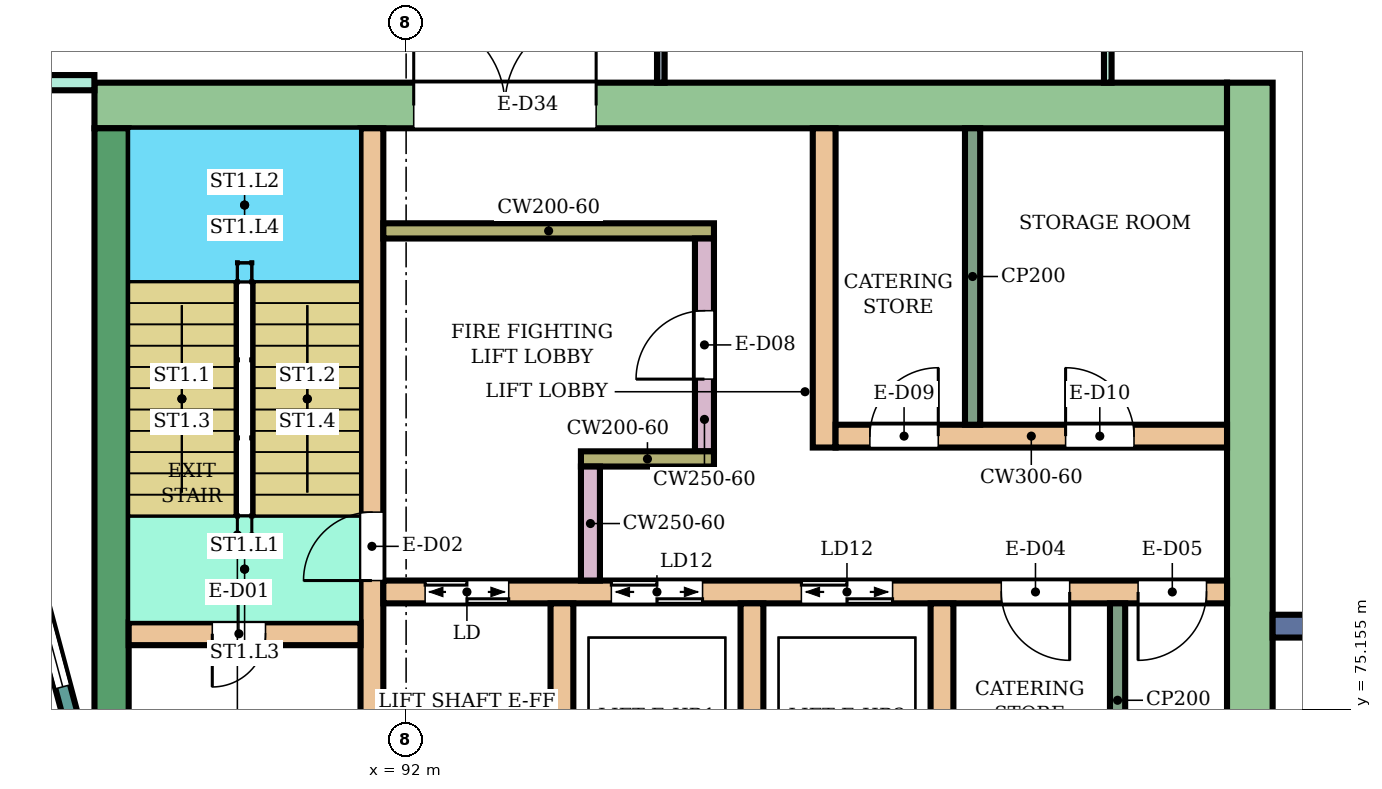
"""IFC4 building model, lengths in metres.
Left out: names, types, materials, properties, quantities, classifications, styles, units other than length and angle.
Written with IfcOpenShell. Run it as: python <this file> out.ifc"""

import sys

from ifc_helpers import new_model, si_unit, direction, frame, frame_2d, origin, place, context, subcontext, project, spatial, rectangle, extrude, element, fill, save


model = new_model("IFC4")
c1 = context("Model", 3, precision=1e-05, world=origin(), true_north=direction((0.0, 1.0)))
c2 = subcontext(c1, "Body", "Model", "MODEL_VIEW")
j1 = project(units=[si_unit("LENGTHUNIT", "METRE"), si_unit("PLANEANGLEUNIT", "RADIAN")], contexts=[c1])
p1 = place(None, origin())
s1 = spatial("IfcSite", under=j1, at=p1, CompositionType="ELEMENT")
p2 = place(p1, origin())
s2 = spatial("IfcBuilding", under=s1, at=p2, CompositionType="ELEMENT")
p3 = place(p2, frame((0.0, 0.0, 229.3)))
s3 = spatial("IfcBuildingStorey", under=s2, at=p3, CompositionType="ELEMENT", Elevation=229.3)
p4 = place(p3, frame((87.9, 83.1, 0.0), z_axis=(0.0, 0.0, 1.0), x_axis=(1.0, 0.0, 0.0)))
e1 = element("IfcWall", 1, at=p4, inside=s3, PredefinedType="SHEAR", context=c2, shape_type="SweptSolid", body=[
    extrude(rectangle(XDim=14.9, YDim=0.6, at=frame_2d((7.45, 0.0))), origin(), (0.0, 0.0, 1.0), 7.68),
])
p5 = place(p4, frame((4.2, 0.0, 0.0)))
e2 = element("IfcOpeningElement", 2, at=p5, cuts=e1, PredefinedType="OPENING", context=c2, shape_type="SweptSolid", body=[
    extrude(rectangle(XDim=2.4, YDim=2.4, at=frame_2d((1.2, 1.2))), frame((0.0, 0.31, 0.0), z_axis=(0.0, -1.0, 0.0), x_axis=(1.0, 0.0, 0.0)), (0.0, 0.0, 1.0), 0.62),
])
p6 = place(p3, frame((88.125, 75.0, 0.0), z_axis=(0.0, 0.0, 1.0), x_axis=(0.0, 1.0, 0.0)))
e3 = element("IfcWall", 3, at=p6, inside=s3, PredefinedType="SHEAR", context=c2, shape_type="SweptSolid", body=[
    extrude(rectangle(XDim=7.8, YDim=0.45, at=frame_2d((3.9, 0.0))), origin(), (0.0, 0.0, 1.0), 7.68),
])
p7 = place(p3, frame((103.1, 66.6, 0.0), z_axis=(0.0, 0.0, 1.0), x_axis=(0.0, 1.0, 0.0)))
e4 = element("IfcWall", 4, at=p7, inside=s3, PredefinedType="SHEAR", context=c2, shape_type="SweptSolid", body=[
    extrude(rectangle(XDim=16.8, YDim=0.6, at=frame_2d((8.4, 0.0))), origin(), (0.0, 0.0, 1.0), 7.68),
])
p8 = place(p3, frame((91.55, 75.0, 0.0), z_axis=(0.0, 0.0, 1.0), x_axis=(0.0, 1.0, 0.0)))
e5 = element("IfcWall", 5, at=p8, inside=s3, PredefinedType="SHEAR", context=c2, shape_type="SweptSolid", body=[
    extrude(rectangle(XDim=7.8, YDim=0.3, at=frame_2d((3.9, 0.0))), origin(), (0.0, 0.0, 1.0), 7.68),
])
p9 = place(p8, frame((1.85, 0.0, 0.0)))
e6 = element("IfcOpeningElement", 6, at=p9, cuts=e5, PredefinedType="OPENING", context=c2, shape_type="SweptSolid", body=[
    extrude(rectangle(XDim=0.9, YDim=2.1, at=frame_2d((0.45, 1.05))), frame((0.0, 0.16, 0.0), z_axis=(0.0, -1.0, 0.0), x_axis=(1.0, 0.0, 0.0)), (0.0, 0.0, 1.0), 0.32),
])
p10 = place(p3, frame((88.35, 76.15, 0.0), z_axis=(0.0, 0.0, 1.0), x_axis=(1.0, 0.0, 0.0)))
e7 = element("IfcWall", 7, at=p10, inside=s3, PredefinedType="SHEAR", context=c2, shape_type="SweptSolid", body=[
    extrude(rectangle(XDim=3.05, YDim=0.3, at=frame_2d((1.525, 0.0))), origin(), (0.0, 0.0, 1.0), 7.68),
])
p11 = place(p10, frame((1.1, 0.0, 0.0)))
e8 = element("IfcOpeningElement", 8, at=p11, cuts=e7, PredefinedType="OPENING", context=c2, shape_type="SweptSolid", body=[
    extrude(rectangle(XDim=0.7, YDim=2.0, at=frame_2d((0.35, 1.0))), frame((0.0, 0.16, 0.0), z_axis=(0.0, -1.0, 0.0), x_axis=(1.0, 0.0, 0.0)), (0.0, 0.0, 1.0), 0.32),
])
p12 = place(p3, frame((91.7, 76.7, 0.0), z_axis=(0.0, 0.0, 1.0), x_axis=(1.0, 0.0, 0.0)))
e9 = element("IfcWall", 9, at=p12, inside=s3, PredefinedType="SHEAR", context=c2, shape_type="SweptSolid", body=[
    extrude(rectangle(XDim=11.1, YDim=0.3, at=frame_2d((5.55, 0.0))), origin(), (0.0, 0.0, 1.0), 7.68),
])
p13 = place(p12, frame((0.55, 0.0, 0.0)))
e10 = element("IfcOpeningElement", 10, at=p13, cuts=e9, PredefinedType="OPENING", context=c2, shape_type="SweptSolid", body=[
    extrude(rectangle(XDim=1.1, YDim=2.1, at=frame_2d((0.55, 1.05))), frame((0.0, 0.16, 0.0), z_axis=(0.0, -1.0, 0.0), x_axis=(1.0, 0.0, 0.0)), (0.0, 0.0, 1.0), 0.32),
])
p14 = place(p12, frame((3.0, 0.0, 0.0)))
e11 = element("IfcOpeningElement", 11, at=p14, cuts=e9, PredefinedType="OPENING", context=c2, shape_type="SweptSolid", body=[
    extrude(rectangle(XDim=1.2, YDim=2.1, at=frame_2d((0.6, 1.05))), frame((0.0, 0.16, 0.0), z_axis=(0.0, -1.0, 0.0), x_axis=(1.0, 0.0, 0.0)), (0.0, 0.0, 1.0), 0.32),
])
p15 = place(p12, frame((5.5, 0.0, 0.0)))
e12 = element("IfcOpeningElement", 12, at=p15, cuts=e9, PredefinedType="OPENING", context=c2, shape_type="SweptSolid", body=[
    extrude(rectangle(XDim=1.2, YDim=2.1, at=frame_2d((0.6, 1.05))), frame((0.0, 0.16, 0.0), z_axis=(0.0, -1.0, 0.0), x_axis=(1.0, 0.0, 0.0)), (0.0, 0.0, 1.0), 0.32),
])
p16 = place(p12, frame((8.13, 0.0, 0.0)))
e13 = element("IfcOpeningElement", 13, at=p16, cuts=e9, PredefinedType="OPENING", context=c2, shape_type="SweptSolid", body=[
    extrude(rectangle(XDim=0.9, YDim=2.1, at=frame_2d((0.45, 1.05))), frame((0.0, 0.16, 0.0), z_axis=(0.0, -1.0, 0.0), x_axis=(1.0, 0.0, 0.0)), (0.0, 0.0, 1.0), 0.32),
])
p17 = place(p12, frame((9.93, 0.0, 0.0)))
e14 = element("IfcOpeningElement", 14, at=p17, cuts=e9, PredefinedType="OPENING", context=c2, shape_type="SweptSolid", body=[
    extrude(rectangle(XDim=0.9, YDim=2.1, at=frame_2d((0.45, 1.05))), frame((0.0, 0.16, 0.0), z_axis=(0.0, -1.0, 0.0), x_axis=(1.0, 0.0, 0.0)), (0.0, 0.0, 1.0), 0.32),
])
for number, where, z_axis, x_axis in (
    (15, (94.05, 74.0, 0.0), (0.0, 0.0, 1.0), (0.0, 1.0, 0.0)),
    (16, (96.55, 74.0, 0.0), (0.0, 0.0, 1.0), (0.0, 1.0, 0.0)),
    (17, (99.05, 74.0, 0.0), (0.0, 0.0, 1.0), (0.0, 1.0, 0.0)),
):
    element("IfcWall", number, at=place(p3, frame(where, z_axis=z_axis, x_axis=x_axis)), inside=s3, PredefinedType="SHEAR", context=c2, shape_type="SweptSolid", body=[
        extrude(rectangle(XDim=2.55, YDim=0.3, at=frame_2d((1.275, 0.0))), origin(), (0.0, 0.0, 1.0), 7.68),
    ])
p18 = place(p3, frame((91.7, 81.45, 0.0), z_axis=(0.0, 0.0, 1.0), x_axis=(1.0, 0.0, 0.0)))
e18 = element("IfcWall", 18, at=p18, inside=s3, PredefinedType="SHEAR", context=c2, shape_type="SweptSolid", body=[
    extrude(rectangle(XDim=4.35, YDim=0.2, at=frame_2d((2.175, 0.0))), origin(), (0.0, 0.0, 1.0), 7.68),
])
p19 = place(p3, frame((95.925, 78.55, 0.0), z_axis=(0.0, 0.0, 1.0), x_axis=(0.0, 1.0, 0.0)))
e19 = element("IfcWall", 19, at=p19, inside=s3, PredefinedType="SHEAR", context=c2, shape_type="SweptSolid", body=[
    extrude(rectangle(XDim=2.8, YDim=0.25, at=frame_2d((1.4, 0.0))), origin(), (0.0, 0.0, 1.0), 7.68),
])
p20 = place(p19, frame((0.95, 0.0, 0.0)))
e20 = element("IfcOpeningElement", 20, at=p20, cuts=e19, PredefinedType="OPENING", context=c2, shape_type="SweptSolid", body=[
    extrude(rectangle(XDim=0.9, YDim=2.1, at=frame_2d((0.45, 1.05))), frame((0.0, 0.135, 0.0), z_axis=(0.0, -1.0, 0.0), x_axis=(1.0, 0.0, 0.0)), (0.0, 0.0, 1.0), 0.27),
])
p21 = place(p3, frame((94.3, 78.45, 0.0), z_axis=(0.0, 0.0, 1.0), x_axis=(1.0, 0.0, 0.0)))
e21 = element("IfcWall", 21, at=p21, inside=s3, PredefinedType="SHEAR", context=c2, shape_type="SweptSolid", body=[
    extrude(rectangle(XDim=1.75, YDim=0.2, at=frame_2d((0.875, 0.0))), origin(), (0.0, 0.0, 1.0), 7.68),
])
p22 = place(p3, frame((94.425, 76.85, 0.0), z_axis=(0.0, 0.0, 1.0), x_axis=(0.0, 1.0, 0.0)))
e22 = element("IfcWall", 22, at=p22, inside=s3, PredefinedType="SHEAR", context=c2, shape_type="SweptSolid", body=[
    extrude(rectangle(XDim=1.5, YDim=0.25, at=frame_2d((0.75, 0.0))), origin(), (0.0, 0.0, 1.0), 7.68),
])
p23 = place(p3, frame((97.5, 78.6, 0.0), z_axis=(0.0, 0.0, 1.0), x_axis=(0.0, 1.0, 0.0)))
e23 = element("IfcWall", 23, at=p23, inside=s3, PredefinedType="SHEAR", context=c2, shape_type="SweptSolid", body=[
    extrude(rectangle(XDim=4.2, YDim=0.3, at=frame_2d((2.1, 0.0))), origin(), (0.0, 0.0, 1.0), 7.68),
])
p24 = place(p3, frame((97.65, 78.75, 0.0), z_axis=(0.0, 0.0, 1.0), x_axis=(1.0, 0.0, 0.0)))
e24 = element("IfcWall", 24, at=p24, inside=s3, PredefinedType="SHEAR", context=c2, shape_type="SweptSolid", body=[
    extrude(rectangle(XDim=5.15, YDim=0.3, at=frame_2d((2.575, 0.0))), origin(), (0.0, 0.0, 1.0), 7.68),
])
p25 = place(p24, frame((0.451, 0.0, 0.0)))
e25 = element("IfcOpeningElement", 25, at=p25, cuts=e24, PredefinedType="OPENING", context=c2, shape_type="SweptSolid", body=[
    extrude(rectangle(XDim=0.9, YDim=2.1, at=frame_2d((0.45, 1.05))), frame((0.0, 0.16, 0.0), z_axis=(0.0, -1.0, 0.0), x_axis=(1.0, 0.0, 0.0)), (0.0, 0.0, 1.0), 0.32),
])
p26 = place(p24, frame((3.026, 0.0, 0.0)))
e26 = element("IfcOpeningElement", 26, at=p26, cuts=e24, PredefinedType="OPENING", context=c2, shape_type="SweptSolid", body=[
    extrude(rectangle(XDim=0.9, YDim=2.1, at=frame_2d((0.45, 1.05))), frame((0.0, 0.16, 0.0), z_axis=(0.0, -1.0, 0.0), x_axis=(1.0, 0.0, 0.0)), (0.0, 0.0, 1.0), 0.32),
])
p27 = place(p3, frame((103.4, 76.25, 0.0), z_axis=(0.0, 0.0, 1.0), x_axis=(1.0, 0.0, 0.0)))
e27 = element("IfcWall", 27, at=p27, inside=s3, PredefinedType="NOTDEFINED", context=c2, shape_type="SweptSolid", body=[
    extrude(rectangle(XDim=2.416, YDim=0.3, at=frame_2d((1.208, 0.0))), origin(), (0.0, 0.0, 1.0), 8.0),
])
p28 = place(p3, frame((87.604, 75.0, 0.0), z_axis=(0.0, 0.0, 1.0), x_axis=(-0.258789828301, 0.965933654434, 0.0)))
e28 = element("IfcWall", 28, at=p28, inside=s3, PredefinedType="NOTDEFINED", context=c2, shape_type="SweptSolid", body=[
    extrude(rectangle(XDim=3.936, YDim=0.2, at=frame_2d((1.968, 0.0))), origin(), (0.0, 0.0, 1.0), 8.0),
])
p29 = place(p28, frame((0.468, 0.0, 0.9)))
e29 = element("IfcOpeningElement", 29, at=p29, cuts=e28, PredefinedType="OPENING", context=c2, shape_type="SweptSolid", body=[
    extrude(rectangle(XDim=3.0, YDim=2.3, at=frame_2d((1.5, 1.15))), frame((0.0, 0.11, 0.0), z_axis=(0.0, -1.0, 0.0), x_axis=(1.0, 0.0, 0.0)), (0.0, 0.0, 1.0), 0.22),
])
p30 = place(p3, frame((84.475, 82.751, 0.0), z_axis=(0.0, 0.0, 1.0), x_axis=(0.499996545922, 0.866027397988, 0.0)))
e30 = element("IfcWall", 30, at=p30, inside=s3, PredefinedType="NOTDEFINED", context=c2, shape_type="SweptSolid", body=[
    extrude(rectangle(XDim=8.25, YDim=0.2, at=frame_2d((4.125, 0.0))), origin(), (0.0, 0.0, 1.0), 8.0),
])
p31 = place(p30, frame((1.0, 0.0, 0.3)))
e31 = element("IfcOpeningElement", 31, at=p31, cuts=e30, PredefinedType="OPENING", context=c2, shape_type="SweptSolid", body=[
    extrude(rectangle(XDim=2.4, YDim=3.6, at=frame_2d((1.2, 1.8))), frame((0.0, 0.11, 0.0), z_axis=(0.0, -1.0, 0.0), x_axis=(1.0, 0.0, 0.0)), (0.0, 0.0, 1.0), 0.22),
])
p32 = place(p30, frame((3.85, 0.0, 0.0)))
e32 = element("IfcOpeningElement", 32, at=p32, cuts=e30, PredefinedType="OPENING", context=c2, shape_type="SweptSolid", body=[
    extrude(rectangle(XDim=1.8, YDim=2.4, at=frame_2d((0.9, 1.2))), frame((0.0, 0.11, 0.0), z_axis=(0.0, -1.0, 0.0), x_axis=(1.0, 0.0, 0.0)), (0.0, 0.0, 1.0), 0.22),
])
p33 = place(p30, frame((6.1, 0.0, 0.3)))
e33 = element("IfcOpeningElement", 33, at=p33, cuts=e30, PredefinedType="OPENING", context=c2, shape_type="SweptSolid", body=[
    extrude(rectangle(XDim=1.6, YDim=3.6, at=frame_2d((0.8, 1.8))), frame((0.0, 0.11, 0.0), z_axis=(0.0, -1.0, 0.0), x_axis=(1.0, 0.0, 0.0)), (0.0, 0.0, 1.0), 0.22),
])
p34 = place(p3, frame((84.851, 83.4, 0.0), z_axis=(0.0, 0.0, 1.0), x_axis=(1.0, 0.0, 0.0)))
e34 = element("IfcWall", 34, at=p34, inside=s3, PredefinedType="PARTITIONING", context=c2, shape_type="SweptSolid", body=[
    extrude(rectangle(XDim=3.048, YDim=0.2, at=frame_2d((1.524, 0.0))), origin(), (0.0, 0.0, 1.0), 7.55),
])
p35 = place(p3, frame((95.351, 83.4, 0.0), z_axis=(0.0, 0.0, 1.0), x_axis=(0.0, 1.0, 0.0)))
e35 = element("IfcWall", 35, at=p35, inside=s3, PredefinedType="PARTITIONING", context=c2, shape_type="SweptSolid", body=[
    extrude(rectangle(XDim=12.06, YDim=0.1, at=frame_2d((6.03, 0.0))), origin(), (0.0, 0.0, 1.0), 7.55),
])
p36 = place(p35, frame((4.23, 0.0, 0.0)))
e36 = element("IfcOpeningElement", 36, at=p36, cuts=e35, PredefinedType="OPENING", context=c2, shape_type="SweptSolid", body=[
    extrude(rectangle(XDim=1.8, YDim=2.1, at=frame_2d((0.9, 1.05))), frame((0.0, 0.06, 0.0), z_axis=(0.0, -1.0, 0.0), x_axis=(1.0, 0.0, 0.0)), (0.0, 0.0, 1.0), 0.12),
])
p37 = place(p3, frame((101.231, 83.4, 0.0), z_axis=(0.0, 0.0, 1.0), x_axis=(0.0, 1.0, 0.0)))
e37 = element("IfcWall", 37, at=p37, inside=s3, PredefinedType="PARTITIONING", context=c2, shape_type="SweptSolid", body=[
    extrude(rectangle(XDim=5.948, YDim=0.1, at=frame_2d((2.974, 0.0))), origin(), (0.0, 0.0, 1.0), 6.83),
])
p38 = place(p37, frame((2.424, 0.0, 0.0)))
e38 = element("IfcOpeningElement", 38, at=p38, cuts=e37, PredefinedType="OPENING", context=c2, shape_type="SweptSolid", body=[
    extrude(rectangle(XDim=0.8, YDim=2.1, at=frame_2d((0.4, 1.05))), frame((0.0, 0.06, 0.0), z_axis=(0.0, -1.0, 0.0), x_axis=(1.0, 0.0, 0.0)), (0.0, 0.0, 1.0), 0.12),
])
p39 = place(p3, frame((101.36, 74.0, 0.0), z_axis=(0.0, 0.0, 1.0), x_axis=(0.0, 1.0, 0.0)))
e39 = element("IfcWall", 39, at=p39, inside=s3, PredefinedType="PARTITIONING", context=c2, shape_type="SweptSolid", body=[
    extrude(rectangle(XDim=2.55, YDim=0.2, at=frame_2d((1.275, 0.0))), origin(), (0.0, 0.0, 1.0), 7.68),
])
p40 = place(p3, frame((99.452, 78.9, 0.0), z_axis=(0.0, 0.0, 1.0), x_axis=(0.0, 1.0, 0.0)))
e40 = element("IfcWall", 40, at=p40, inside=s3, PredefinedType="PARTITIONING", context=c2, shape_type="SweptSolid", body=[
    extrude(rectangle(XDim=3.9, YDim=0.2, at=frame_2d((1.95, 0.0))), origin(), (0.0, 0.0, 1.0), 7.68),
])
p41 = place(p29, origin())
e41 = element("IfcWindow", 41, at=p41, inside=s3, PartitioningType="SINGLE_PANEL", PredefinedType="WINDOW", context=c2, shape_type="SweptSolid", body=[
    extrude(rectangle(XDim=3.0, YDim=2.3, at=frame_2d((1.5, 1.15))), frame((0.0, 0.03, 0.0), z_axis=(0.0, -1.0, 0.0), x_axis=(1.0, 0.0, 0.0)), (0.0, 0.0, 1.0), 0.06),
])
fill(e29, e41)
p42 = place(p11, frame((0.7, 0.0, 0.0), z_axis=(0.0, 0.0, 1.0), x_axis=(-1.0, 0.0, 0.0)))
e42 = element("IfcDoor", 42, at=p42, inside=s3, OperationType="SINGLE_SWING_RIGHT", PredefinedType="DOOR", context=c2, shape_type="SweptSolid", body=[
    extrude(rectangle(XDim=0.7, YDim=2.0, at=frame_2d((0.35, 1.0))), frame((0.0, 0.025, 0.0), z_axis=(0.0, -1.0, 0.0), x_axis=(1.0, 0.0, 0.0)), (0.0, 0.0, 1.0), 0.05),
])
fill(e8, e42)
p43 = place(p9, origin())
e43 = element("IfcDoor", 43, at=p43, inside=s3, OperationType="SINGLE_SWING_LEFT", PredefinedType="DOOR", context=c2, shape_type="SweptSolid", body=[
    extrude(rectangle(XDim=0.9, YDim=2.1, at=frame_2d((0.45, 1.05))), frame((0.0, 0.025, 0.0), z_axis=(0.0, -1.0, 0.0), x_axis=(1.0, 0.0, 0.0)), (0.0, 0.0, 1.0), 0.05),
])
fill(e6, e43)
p44 = place(p13, origin())
e44 = element("IfcDoor", 44, at=p44, inside=s3, OperationType="DOUBLE_DOOR_SLIDING", PredefinedType="DOOR", context=c2, shape_type="SweptSolid", body=[
    extrude(rectangle(XDim=1.1, YDim=2.1, at=frame_2d((0.55, 1.05))), frame((0.0, 0.025, 0.0), z_axis=(0.0, -1.0, 0.0), x_axis=(1.0, 0.0, 0.0)), (0.0, 0.0, 1.0), 0.05),
])
fill(e10, e44)
p45 = place(p14, origin())
e45 = element("IfcDoor", 45, at=p45, inside=s3, OperationType="DOUBLE_DOOR_SLIDING", PredefinedType="DOOR", context=c2, shape_type="SweptSolid", body=[
    extrude(rectangle(XDim=1.2, YDim=2.1, at=frame_2d((0.6, 1.05))), frame((0.0, 0.025, 0.0), z_axis=(0.0, -1.0, 0.0), x_axis=(1.0, 0.0, 0.0)), (0.0, 0.0, 1.0), 0.05),
])
fill(e11, e45)
p46 = place(p15, origin())
e46 = element("IfcDoor", 46, at=p46, inside=s3, OperationType="DOUBLE_DOOR_SLIDING", PredefinedType="DOOR", context=c2, shape_type="SweptSolid", body=[
    extrude(rectangle(XDim=1.2, YDim=2.1, at=frame_2d((0.6, 1.05))), frame((0.0, 0.025, 0.0), z_axis=(0.0, -1.0, 0.0), x_axis=(1.0, 0.0, 0.0)), (0.0, 0.0, 1.0), 0.05),
])
fill(e12, e46)
p47 = place(p16, frame((0.9, 0.0, 0.0), z_axis=(0.0, 0.0, 1.0), x_axis=(-1.0, 0.0, 0.0)))
e47 = element("IfcDoor", 47, at=p47, inside=s3, OperationType="SINGLE_SWING_LEFT", PredefinedType="DOOR", context=c2, shape_type="SweptSolid", body=[
    extrude(rectangle(XDim=0.9, YDim=2.1, at=frame_2d((0.45, 1.05))), frame((0.0, 0.025, 0.0), z_axis=(0.0, -1.0, 0.0), x_axis=(1.0, 0.0, 0.0)), (0.0, 0.0, 1.0), 0.05),
])
fill(e13, e47)
p48 = place(p17, frame((0.9, 0.0, 0.0), z_axis=(0.0, 0.0, 1.0), x_axis=(-1.0, 0.0, 0.0)))
e48 = element("IfcDoor", 48, at=p48, inside=s3, OperationType="SINGLE_SWING_RIGHT", PredefinedType="DOOR", context=c2, shape_type="SweptSolid", body=[
    extrude(rectangle(XDim=0.9, YDim=2.1, at=frame_2d((0.45, 1.05))), frame((0.0, 0.025, 0.0), z_axis=(0.0, -1.0, 0.0), x_axis=(1.0, 0.0, 0.0)), (0.0, 0.0, 1.0), 0.05),
])
fill(e14, e48)
p49 = place(p20, origin())
e49 = element("IfcDoor", 49, at=p49, inside=s3, OperationType="SINGLE_SWING_LEFT", PredefinedType="DOOR", context=c2, shape_type="SweptSolid", body=[
    extrude(rectangle(XDim=0.9, YDim=2.1, at=frame_2d((0.45, 1.05))), frame((0.0, 0.025, 0.0), z_axis=(0.0, -1.0, 0.0), x_axis=(1.0, 0.0, 0.0)), (0.0, 0.0, 1.0), 0.05),
])
fill(e20, e49)
p50 = place(p25, origin())
e50 = element("IfcDoor", 50, at=p50, inside=s3, OperationType="SINGLE_SWING_RIGHT", PredefinedType="DOOR", context=c2, shape_type="SweptSolid", body=[
    extrude(rectangle(XDim=0.9, YDim=2.1, at=frame_2d((0.45, 1.05))), frame((0.0, 0.025, 0.0), z_axis=(0.0, -1.0, 0.0), x_axis=(1.0, 0.0, 0.0)), (0.0, 0.0, 1.0), 0.05),
])
fill(e25, e50)
p51 = place(p26, origin())
e51 = element("IfcDoor", 51, at=p51, inside=s3, OperationType="SINGLE_SWING_LEFT", PredefinedType="DOOR", context=c2, shape_type="SweptSolid", body=[
    extrude(rectangle(XDim=0.9, YDim=2.1, at=frame_2d((0.45, 1.05))), frame((0.0, 0.025, 0.0), z_axis=(0.0, -1.0, 0.0), x_axis=(1.0, 0.0, 0.0)), (0.0, 0.0, 1.0), 0.05),
])
fill(e26, e51)
p52 = place(p5, origin())
e52 = element("IfcDoor", 52, at=p52, inside=s3, OperationType="DOUBLE_DOOR_SINGLE_SWING", PredefinedType="DOOR", context=c2, shape_type="SweptSolid", body=[
    extrude(rectangle(XDim=2.4, YDim=2.4, at=frame_2d((1.2, 1.2))), frame((0.0, 0.025, 0.0), z_axis=(0.0, -1.0, 0.0), x_axis=(1.0, 0.0, 0.0)), (0.0, 0.0, 1.0), 0.05),
])
fill(e2, e52)
save(model, sys.argv[1])
